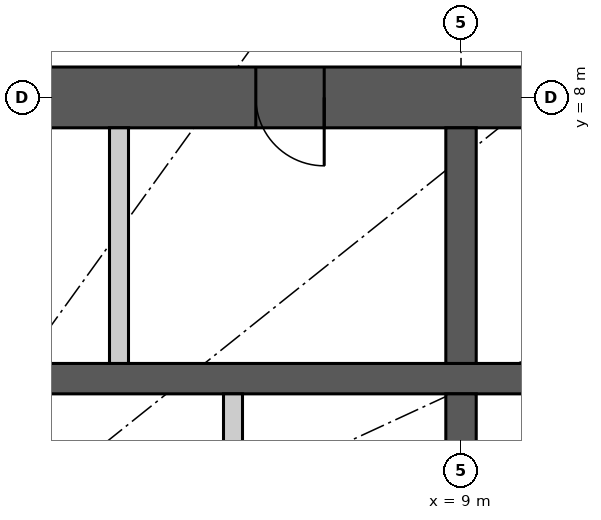
"""IFC4 building model, lengths in metres.
Left out: names, types, materials, properties, quantities, classifications, styles, units other than length and angle.
Written with IfcOpenShell. Run it as: python <this file> out.ifc"""

import sys

from ifc_helpers import new_model, si_unit, direction, frame, frame_2d, origin, place, context, subcontext, project, spatial, rectangle, extrude, element, fill, save


model = new_model("IFC4")
c1 = context("Model", 3, precision=1e-05, world=origin(), true_north=direction((0.0, 1.0)))
c2 = subcontext(c1, "Body", "Model", "MODEL_VIEW")
j1 = project(units=[si_unit("LENGTHUNIT", "METRE"), si_unit("PLANEANGLEUNIT", "RADIAN")], contexts=[c1])
p1 = place(None, origin())
s1 = spatial("IfcSite", under=j1, at=p1, CompositionType="ELEMENT")
p2 = place(p1, origin())
s2 = spatial("IfcBuilding", under=s1, at=p2, CompositionType="ELEMENT")
p3 = place(p2, frame((0.0, 0.0, 100.2)))
s3 = spatial("IfcBuildingStorey", under=s2, at=p3, CompositionType="ELEMENT", Elevation=100.2)
p4 = place(p3, frame((-12.4, 8.0, 0.0), z_axis=(0.0, 0.0, 1.0), x_axis=(1.0, 0.0, 0.0)))
e1 = element("IfcWall", 1, at=p4, inside=s3, PredefinedType="SHEAR", context=c2, shape_type="SweptSolid", body=[
    extrude(rectangle(XDim=24.8, YDim=0.8, at=frame_2d((12.4, 0.0))), origin(), (0.0, 0.0, 1.0), 5.4),
])
p5 = place(p4, frame((11.1, 0.0, 0.0)))
e2 = element("IfcOpeningElement", 2, at=p5, cuts=e1, PredefinedType="OPENING", context=c2, shape_type="SweptSolid", body=[
    extrude(rectangle(XDim=1.2, YDim=2.2, at=frame_2d((0.6, 1.1))), frame((0.0, 0.41, 0.0), z_axis=(0.0, -1.0, 0.0), x_axis=(1.0, 0.0, 0.0)), (0.0, 0.0, 1.0), 0.82),
])
p6 = place(p4, frame((18.7, 0.0, 0.0)))
e3 = element("IfcOpeningElement", 3, at=p6, cuts=e1, PredefinedType="OPENING", context=c2, shape_type="SweptSolid", body=[
    extrude(rectangle(XDim=0.9, YDim=2.2, at=frame_2d((0.45, 1.1))), frame((0.0, 0.41, 0.0), z_axis=(0.0, -1.0, 0.0), x_axis=(1.0, 0.0, 0.0)), (0.0, 0.0, 1.0), 0.82),
])
p7 = place(p3, frame((-11.6, 4.3, 0.0), z_axis=(0.0, 0.0, 1.0), x_axis=(1.0, 0.0, 0.0)))
e4 = element("IfcWall", 4, at=p7, inside=s3, PredefinedType="SHEAR", context=c2, shape_type="SweptSolid", body=[
    extrude(rectangle(XDim=23.2, YDim=0.4, at=frame_2d((11.6, 0.0))), origin(), (0.0, 0.0, 1.0), 5.4),
])
p8 = place(p3, frame((9.0, 4.5, 0.0), z_axis=(0.0, 0.0, 1.0), x_axis=(0.0, 1.0, 0.0)))
e5 = element("IfcWall", 5, at=p8, inside=s3, PredefinedType="SHEAR", context=c2, shape_type="SweptSolid", body=[
    extrude(rectangle(XDim=3.1, YDim=0.4, at=frame_2d((1.55, 0.0))), origin(), (0.0, 0.0, 1.0), 5.4),
])
p9 = place(p3, frame((9.0, 1.75, 0.0), z_axis=(0.0, 0.0, 1.0), x_axis=(0.0, 1.0, 0.0)))
e6 = element("IfcWall", 6, at=p9, inside=s3, PredefinedType="SHEAR", context=c2, shape_type="SweptSolid", body=[
    extrude(rectangle(XDim=2.35, YDim=0.4, at=frame_2d((1.175, 0.0))), origin(), (0.0, 0.0, 1.0), 5.4),
])
p10 = place(p3, frame((4.5, 4.5, 0.0), z_axis=(0.0, 0.0, 1.0), x_axis=(0.0, 1.0, 0.0)))
e7 = element("IfcWall", 7, at=p10, inside=s3, PredefinedType="PARTITIONING", context=c2, shape_type="SweptSolid", body=[
    extrude(rectangle(XDim=3.1, YDim=0.25, at=frame_2d((1.55, 0.0))), origin(), (0.0, 0.0, 1.0), 5.4),
])
p11 = place(p3, frame((6.0, 1.75, 0.0), z_axis=(0.0, 0.0, 1.0), x_axis=(0.0, 1.0, 0.0)))
e8 = element("IfcWall", 8, at=p11, inside=s3, PredefinedType="PARTITIONING", context=c2, shape_type="SweptSolid", body=[
    extrude(rectangle(XDim=2.35, YDim=0.25, at=frame_2d((1.175, 0.0))), origin(), (0.0, 0.0, 1.0), 5.4),
])
p12 = place(p6, origin())
e9 = element("IfcDoor", 9, at=p12, inside=s3, OperationType="SINGLE_SWING_RIGHT", PredefinedType="DOOR", context=c2, shape_type="SweptSolid", body=[
    extrude(rectangle(XDim=0.9, YDim=2.2, at=frame_2d((0.45, 1.1))), frame((0.0, 0.025, 0.0), z_axis=(0.0, -1.0, 0.0), x_axis=(1.0, 0.0, 0.0)), (0.0, 0.0, 1.0), 0.05),
])
fill(e3, e9)
save(model, sys.argv[1])
